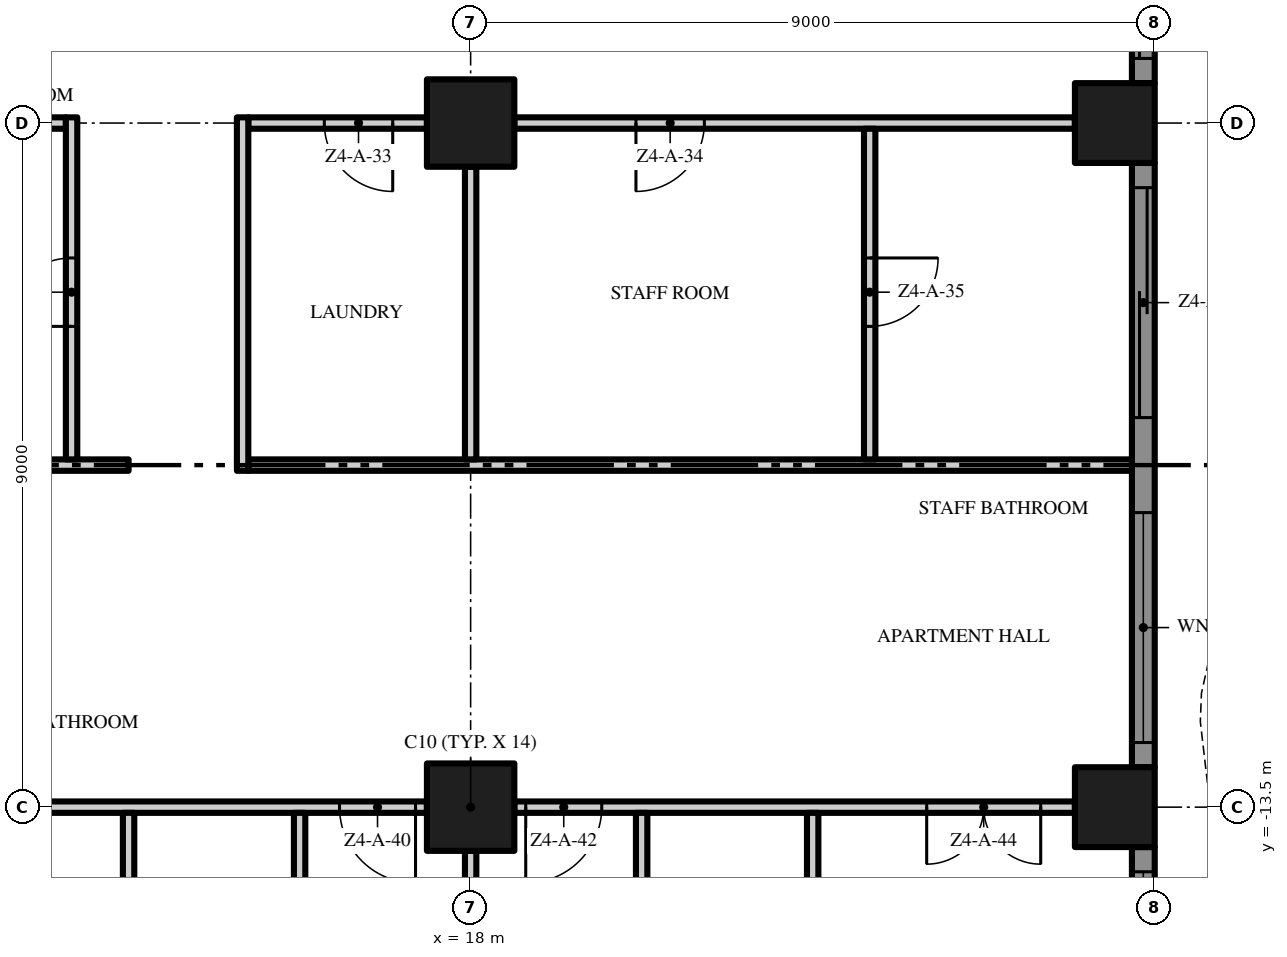
"""IFC4 building model, lengths in metres.
Left out: names, types, materials, properties, quantities, classifications, styles, units other than length and angle.
Written with IfcOpenShell. Run it as: python <this file> out.ifc"""

import sys

from ifc_helpers import new_model, si_unit, direction, frame, frame_2d, origin, origin_2d, place, context, subcontext, project, spatial, polyline, rectangle, outline, extrude, element, fill, save


model = new_model("IFC4")
c1 = context("Model", 3, precision=1e-05, world=origin(), true_north=direction((0.0, 1.0)))
c2 = subcontext(c1, "Body", "Model", "MODEL_VIEW")
j1 = project(units=[si_unit("LENGTHUNIT", "METRE"), si_unit("PLANEANGLEUNIT", "RADIAN")], contexts=[c1])
p1 = place(None, origin())
s1 = spatial("IfcSite", under=j1, at=p1, CompositionType="ELEMENT")
p2 = place(p1, origin())
s2 = spatial("IfcBuilding", under=s1, at=p2, CompositionType="ELEMENT")
p3 = place(p2, frame((0.0, 0.0, 192.0)))
s3 = spatial("IfcBuildingStorey", under=s2, at=p3, CompositionType="ELEMENT", Elevation=192.0)
for number, where, z_axis, x_axis in (
    (1, (18.0, -13.5, 0.0), (0.0, 0.0, 1.0), (1.0, 0.0, 0.0)),
    (2, (18.0, -4.5, 0.0), (0.0, 0.0, 1.0), (1.0, 0.0, 0.0)),
):
    element("IfcColumn", number, at=place(p3, frame(where, z_axis=z_axis, x_axis=x_axis)), inside=s3, PredefinedType="COLUMN", context=c2, shape_type="SweptSolid", body=[
        extrude(rectangle(XDim=1.15, YDim=1.15, at=origin_2d()), origin(), (0.0, 0.0, 1.0), 3.5),
    ])
for number, where, z_axis, x_axis in (
    (3, (26.475, -13.5, 0.0), (0.0, 0.0, 1.0), (1.0, 0.0, 0.0)),
    (4, (26.475, -4.5, 0.0), (0.0, 0.0, 1.0), (1.0, 0.0, 0.0)),
):
    element("IfcColumn", number, at=place(p3, frame(where, z_axis=z_axis, x_axis=x_axis)), inside=s3, PredefinedType="COLUMN", context=c2, shape_type="SweptSolid", body=[
        extrude(rectangle(XDim=1.05, YDim=1.05, at=origin_2d()), origin(), (0.0, 0.0, 1.0), 3.5),
    ])
p4 = place(p3, frame((26.85, -14.025, 0.0), z_axis=(0.0, 0.0, 1.0), x_axis=(0.0, -1.0, 0.0)))
e5 = element("IfcWall", 5, at=p4, inside=s3, PredefinedType="SOLIDWALL", context=c2, shape_type="SweptSolid", body=[
    extrude(rectangle(XDim=3.675, YDim=0.3, at=frame_2d((1.837, 0.0))), origin(), (0.0, 0.0, 1.0), 3.5),
])
p5 = place(p4, frame((0.325, 0.0, 0.45)))
e6 = element("IfcOpeningElement", 6, at=p5, cuts=e5, PredefinedType="OPENING", context=c2, shape_type="SweptSolid", body=[
    extrude(rectangle(XDim=3.025, YDim=2.65, at=frame_2d((1.512, 1.325))), frame((0.0, 0.16, 0.0), z_axis=(0.0, -1.0, 0.0), x_axis=(1.0, 0.0, 0.0)), (0.0, 0.0, 1.0), 0.32),
])
p6 = place(p3, frame((26.85, -5.025, 0.0), z_axis=(0.0, 0.0, 1.0), x_axis=(0.0, -1.0, 0.0)))
e7 = element("IfcWall", 7, at=p6, inside=s3, PredefinedType="SOLIDWALL", context=c2, shape_type="SweptSolid", body=[
    extrude(rectangle(XDim=7.95, YDim=0.3, at=frame_2d((3.975, 0.0))), origin(), (0.0, 0.0, 1.0), 3.5),
])
p7 = place(p6, frame((4.6, 0.0, 0.45)))
e8 = element("IfcOpeningElement", 8, at=p7, cuts=e7, PredefinedType="OPENING", context=c2, shape_type="SweptSolid", body=[
    extrude(rectangle(XDim=3.025, YDim=2.65, at=frame_2d((1.512, 1.325))), frame((0.0, 0.16, 0.0), z_axis=(0.0, -1.0, 0.0), x_axis=(1.0, 0.0, 0.0)), (0.0, 0.0, 1.0), 0.32),
])
p8 = place(p6, frame((0.325, 0.0, 0.0)))
e9 = element("IfcOpeningElement", 9, at=p8, cuts=e7, PredefinedType="OPENING", context=c2, shape_type="SweptSolid", body=[
    extrude(rectangle(XDim=3.025, YDim=2.4, at=frame_2d((1.512, 1.2))), frame((0.0, 0.16, 0.0), z_axis=(0.0, -1.0, 0.0), x_axis=(1.0, 0.0, 0.0)), (0.0, 0.0, 1.0), 0.32),
])
p9 = place(p3, frame((26.85, 3.975, 0.0), z_axis=(0.0, 0.0, 1.0), x_axis=(0.0, -1.0, 0.0)))
e10 = element("IfcWall", 10, at=p9, inside=s3, PredefinedType="SOLIDWALL", context=c2, shape_type="SweptSolid", body=[
    extrude(rectangle(XDim=7.95, YDim=0.3, at=frame_2d((3.975, 0.0))), origin(), (0.0, 0.0, 1.0), 3.5),
])
p10 = place(p9, frame((4.6, 0.0, 0.0)))
e11 = element("IfcOpeningElement", 11, at=p10, cuts=e10, PredefinedType="OPENING", context=c2, shape_type="SweptSolid", body=[
    extrude(rectangle(XDim=3.025, YDim=2.4, at=frame_2d((1.512, 1.2))), frame((0.0, 0.16, 0.0), z_axis=(0.0, -1.0, 0.0), x_axis=(1.0, 0.0, 0.0)), (0.0, 0.0, 1.0), 0.32),
])
p11 = place(p9, frame((0.325, 0.0, 0.45)))
e12 = element("IfcOpeningElement", 12, at=p11, cuts=e10, PredefinedType="OPENING", context=c2, shape_type="SweptSolid", body=[
    extrude(rectangle(XDim=3.025, YDim=2.65, at=frame_2d((1.512, 1.325))), frame((0.0, 0.16, 0.0), z_axis=(0.0, -1.0, 0.0), x_axis=(1.0, 0.0, 0.0)), (0.0, 0.0, 1.0), 0.32),
])
p12 = place(p3, origin())
e13 = element("IfcWall", 13, at=p12, inside=s3, PredefinedType="USERDEFINED", context=c2, shape_type="SweptSolid", body=[
    extrude(outline(polyline([(29.649, -18.0), (28.988, -16.5), (28.255, -15.0), (27.731, -13.5), (27.6, -12.375), (27.615, -12.0), (27.951, -10.5), (28.612, -9.0), (29.345, -7.5), (29.869, -6.0), (30.0, -4.875), (29.985, -4.5), (29.649, -3.0), (28.988, -1.5), (28.255, 0.0), (27.731, 1.5), (27.6, 2.625), (27.615, 3.0), (27.951, 4.5), (28.612, 6.0), (29.345, 7.5), (29.869, 9.0), (30.0, 10.125), (29.985, 10.5), (29.649, 12.0), (28.988, 13.5), (28.255, 15.0), (27.731, 16.5), (27.6, 17.625), (27.615, 18.0), (27.365, 18.01), (27.349, 17.615), (27.486, 16.444), (28.024, 14.904), (28.761, 13.395), (29.41, 11.921), (29.736, 10.467), (29.749, 10.135), (29.624, 9.056), (29.114, 7.596), (28.385, 6.105), (27.713, 4.579), (27.366, 3.033), (27.349, 2.615), (27.486, 1.444), (28.024, -0.096), (28.761, -1.605), (29.41, -3.079), (29.736, -4.533), (29.749, -4.865), (29.624, -5.944), (29.114, -7.404), (28.385, -8.895), (27.713, -10.421), (27.366, -11.967), (27.349, -12.385), (27.486, -13.556), (28.024, -15.096), (28.761, -16.605), (29.42, -18.101), (29.649, -18.0)])), origin(), (0.0, 0.0, 1.0), 0.9),
])
p13 = place(p3, frame((17.425, -13.5, 0.0), z_axis=(0.0, 0.0, 1.0), x_axis=(-1.0, 0.0, 0.0)))
e14 = element("IfcWall", 14, at=p13, inside=s3, PredefinedType="PARTITIONING", context=c2, shape_type="SweptSolid", body=[
    extrude(rectangle(XDim=7.85, YDim=0.15, at=frame_2d((3.925, 0.0))), origin(), (0.0, 0.0, 1.0), 3.5),
])
p14 = place(p13, frame((6.7, 0.0, 0.0)))
e15 = element("IfcOpeningElement", 15, at=p14, cuts=e14, PredefinedType="OPENING", context=c2, shape_type="SweptSolid", body=[
    extrude(rectangle(XDim=1.0, YDim=2.4, at=frame_2d((0.5, 1.2))), frame((0.0, 0.085, 0.0), z_axis=(0.0, -1.0, 0.0), x_axis=(1.0, 0.0, 0.0)), (0.0, 0.0, 1.0), 0.17),
])
p15 = place(p13, frame((0.15, 0.0, 0.0)))
e16 = element("IfcOpeningElement", 16, at=p15, cuts=e14, PredefinedType="OPENING", context=c2, shape_type="SweptSolid", body=[
    extrude(rectangle(XDim=1.0, YDim=2.4, at=frame_2d((0.5, 1.2))), frame((0.0, 0.085, 0.0), z_axis=(0.0, -1.0, 0.0), x_axis=(1.0, 0.0, 0.0)), (0.0, 0.0, 1.0), 0.17),
])
p16 = place(p3, frame((25.95, -13.5, 0.0), z_axis=(0.0, 0.0, 1.0), x_axis=(-1.0, 0.0, 0.0)))
e17 = element("IfcWall", 17, at=p16, inside=s3, PredefinedType="PARTITIONING", context=c2, shape_type="SweptSolid", body=[
    extrude(rectangle(XDim=7.375, YDim=0.15, at=frame_2d((3.688, 0.0))), origin(), (0.0, 0.0, 1.0), 3.5),
])
p17 = place(p16, frame((6.225, 0.0, 0.0)))
e18 = element("IfcOpeningElement", 18, at=p17, cuts=e17, PredefinedType="OPENING", context=c2, shape_type="SweptSolid", body=[
    extrude(rectangle(XDim=1.0, YDim=2.4, at=frame_2d((0.5, 1.2))), frame((0.0, 0.085, 0.0), z_axis=(0.0, -1.0, 0.0), x_axis=(1.0, 0.0, 0.0)), (0.0, 0.0, 1.0), 0.17),
])
p18 = place(p16, frame((0.45, 0.0, 0.0)))
e19 = element("IfcOpeningElement", 19, at=p18, cuts=e17, PredefinedType="OPENING", context=c2, shape_type="SweptSolid", body=[
    extrude(rectangle(XDim=1.5, YDim=2.4, at=frame_2d((0.75, 1.2))), frame((0.0, 0.085, 0.0), z_axis=(0.0, -1.0, 0.0), x_axis=(1.0, 0.0, 0.0)), (0.0, 0.0, 1.0), 0.17),
])
p19 = place(p3, frame((0.1, -9.0, 0.0), z_axis=(0.0, 0.0, 1.0), x_axis=(1.0, 0.0, 0.0)))
e20 = element("IfcWall", 20, at=p19, inside=s3, PredefinedType="PARTITIONING", context=c2, shape_type="SweptSolid", body=[
    extrude(rectangle(XDim=13.4, YDim=0.15, at=frame_2d((6.7, 0.0))), origin(), (0.0, 0.0, 1.0), 3.5),
])
p20 = place(p19, frame((6.9, 0.0, 0.0)))
e21 = element("IfcOpeningElement", 21, at=p20, cuts=e20, PredefinedType="OPENING", context=c2, shape_type="SweptSolid", body=[
    extrude(rectangle(XDim=1.0, YDim=2.4, at=frame_2d((0.5, 1.2))), frame((0.0, 0.085, 0.0), z_axis=(0.0, -1.0, 0.0), x_axis=(1.0, 0.0, 0.0)), (0.0, 0.0, 1.0), 0.17),
])
p21 = place(p3, frame((15.075, -9.0, 0.0), z_axis=(0.0, 0.0, 1.0), x_axis=(1.0, 0.0, 0.0)))
e22 = element("IfcWall", 22, at=p21, inside=s3, PredefinedType="PARTITIONING", context=c2, shape_type="SweptSolid", body=[
    extrude(rectangle(XDim=11.625, YDim=0.15, at=frame_2d((5.812, 0.0))), origin(), (0.0, 0.0, 1.0), 3.5),
])
p22 = place(p3, frame((9.575, -4.5, 0.0), z_axis=(0.0, 0.0, 1.0), x_axis=(1.0, 0.0, 0.0)))
e23 = element("IfcWall", 23, at=p22, inside=s3, PredefinedType="PARTITIONING", context=c2, shape_type="SweptSolid", body=[
    extrude(rectangle(XDim=3.1, YDim=0.15, at=frame_2d((1.55, 0.0))), origin(), (0.0, 0.0, 1.0), 3.5),
])
p23 = place(p3, frame((17.425, -4.5, 0.0), z_axis=(0.0, 0.0, 1.0), x_axis=(-1.0, 0.0, 0.0)))
e24 = element("IfcWall", 24, at=p23, inside=s3, PredefinedType="PARTITIONING", context=c2, shape_type="SweptSolid", body=[
    extrude(rectangle(XDim=2.35, YDim=0.15, at=frame_2d((1.175, 0.0))), origin(), (0.0, 0.0, 1.0), 3.5),
])
p24 = place(p23, frame((0.45, 0.0, 0.0)))
e25 = element("IfcOpeningElement", 25, at=p24, cuts=e24, PredefinedType="OPENING", context=c2, shape_type="SweptSolid", body=[
    extrude(rectangle(XDim=0.9, YDim=2.1, at=frame_2d((0.45, 1.05))), frame((0.0, 0.085, 0.0), z_axis=(0.0, -1.0, 0.0), x_axis=(1.0, 0.0, 0.0)), (0.0, 0.0, 1.0), 0.17),
])
p25 = place(p3, frame((25.95, -4.5, 0.0), z_axis=(0.0, 0.0, 1.0), x_axis=(-1.0, 0.0, 0.0)))
e26 = element("IfcWall", 26, at=p25, inside=s3, PredefinedType="PARTITIONING", context=c2, shape_type="SweptSolid", body=[
    extrude(rectangle(XDim=7.375, YDim=0.15, at=frame_2d((3.688, 0.0))), origin(), (0.0, 0.0, 1.0), 3.5),
])
p26 = place(p25, frame((4.875, 0.0, 0.0)))
e27 = element("IfcOpeningElement", 27, at=p26, cuts=e26, PredefinedType="OPENING", context=c2, shape_type="SweptSolid", body=[
    extrude(rectangle(XDim=0.9, YDim=2.1, at=frame_2d((0.45, 1.05))), frame((0.0, 0.085, 0.0), z_axis=(0.0, -1.0, 0.0), x_axis=(1.0, 0.0, 0.0)), (0.0, 0.0, 1.0), 0.17),
])
p27 = place(p3, frame((12.75, -8.925, 0.0), z_axis=(0.0, 0.0, 1.0), x_axis=(0.0, 1.0, 0.0)))
e28 = element("IfcWall", 28, at=p27, inside=s3, PredefinedType="PARTITIONING", context=c2, shape_type="SweptSolid", body=[
    extrude(rectangle(XDim=4.5, YDim=0.15, at=frame_2d((2.25, 0.0))), origin(), (0.0, 0.0, 1.0), 3.5),
])
p28 = place(p27, frame((1.75, 0.0, 0.0)))
e29 = element("IfcOpeningElement", 29, at=p28, cuts=e28, PredefinedType="OPENING", context=c2, shape_type="SweptSolid", body=[
    extrude(rectangle(XDim=0.9, YDim=2.1, at=frame_2d((0.45, 1.05))), frame((0.0, 0.085, 0.0), z_axis=(0.0, -1.0, 0.0), x_axis=(1.0, 0.0, 0.0)), (0.0, 0.0, 1.0), 0.17),
])
p29 = place(p3, frame((13.5, -22.2, 0.0), z_axis=(0.0, 0.0, 1.0), x_axis=(0.0, 1.0, 0.0)))
e30 = element("IfcWall", 30, at=p29, inside=s3, PredefinedType="PARTITIONING", context=c2, shape_type="SweptSolid", body=[
    extrude(rectangle(XDim=8.625, YDim=0.15, at=frame_2d((4.312, 0.0))), origin(), (0.0, 0.0, 1.0), 3.5),
])
p30 = place(p3, frame((15.0, -9.075, 0.0), z_axis=(0.0, 0.0, 1.0), x_axis=(0.0, 1.0, 0.0)))
e31 = element("IfcWall", 31, at=p30, inside=s3, PredefinedType="PARTITIONING", context=c2, shape_type="SweptSolid", body=[
    extrude(rectangle(XDim=4.65, YDim=0.15, at=frame_2d((2.325, 0.0))), origin(), (0.0, 0.0, 1.0), 3.5),
])
p31 = place(p3, frame((15.75, -16.575, 0.0), z_axis=(0.0, 0.0, 1.0), x_axis=(0.0, 1.0, 0.0)))
e32 = element("IfcWall", 32, at=p31, inside=s3, PredefinedType="PARTITIONING", context=c2, shape_type="SweptSolid", body=[
    extrude(rectangle(XDim=3.0, YDim=0.15, at=frame_2d((1.5, 0.0))), origin(), (0.0, 0.0, 1.0), 3.5),
])
p32 = place(p3, frame((18.0, -21.45, 0.0), z_axis=(0.0, 0.0, 1.0), x_axis=(0.0, 1.0, 0.0)))
e33 = element("IfcWall", 33, at=p32, inside=s3, PredefinedType="PARTITIONING", context=c2, shape_type="SweptSolid", body=[
    extrude(rectangle(XDim=7.375, YDim=0.15, at=frame_2d((3.688, 0.0))), origin(), (0.0, 0.0, 1.0), 3.5),
])
p33 = place(p3, frame((18.0, -8.925, 0.0), z_axis=(0.0, 0.0, 1.0), x_axis=(0.0, 1.0, 0.0)))
e34 = element("IfcWall", 34, at=p33, inside=s3, PredefinedType="PARTITIONING", context=c2, shape_type="SweptSolid", body=[
    extrude(rectangle(XDim=3.85, YDim=0.15, at=frame_2d((1.925, 0.0))), origin(), (0.0, 0.0, 1.0), 3.5),
])
p34 = place(p3, frame((20.25, -16.575, 0.0), z_axis=(0.0, 0.0, 1.0), x_axis=(0.0, 1.0, 0.0)))
e35 = element("IfcWall", 35, at=p34, inside=s3, PredefinedType="PARTITIONING", context=c2, shape_type="SweptSolid", body=[
    extrude(rectangle(XDim=3.0, YDim=0.15, at=frame_2d((1.5, 0.0))), origin(), (0.0, 0.0, 1.0), 3.5),
])
p35 = place(p3, frame((22.5, -17.475, 0.0), z_axis=(0.0, 0.0, 1.0), x_axis=(0.0, 1.0, 0.0)))
e36 = element("IfcWall", 36, at=p35, inside=s3, PredefinedType="PARTITIONING", context=c2, shape_type="SweptSolid", body=[
    extrude(rectangle(XDim=3.9, YDim=0.15, at=frame_2d((1.95, 0.0))), origin(), (0.0, 0.0, 1.0), 3.5),
])
p36 = place(p3, frame((23.25, -4.575, 0.0), z_axis=(0.0, 0.0, 1.0), x_axis=(0.0, -1.0, 0.0)))
e37 = element("IfcWall", 37, at=p36, inside=s3, PredefinedType="PARTITIONING", context=c2, shape_type="SweptSolid", body=[
    extrude(rectangle(XDim=4.35, YDim=0.15, at=frame_2d((2.175, 0.0))), origin(), (0.0, 0.0, 1.0), 3.5),
])
p37 = place(p36, frame((1.7, 0.0, 0.0)))
e38 = element("IfcOpeningElement", 38, at=p37, cuts=e37, PredefinedType="OPENING", context=c2, shape_type="SweptSolid", body=[
    extrude(rectangle(XDim=0.9, YDim=2.1, at=frame_2d((0.45, 1.05))), frame((0.0, 0.085, 0.0), z_axis=(0.0, -1.0, 0.0), x_axis=(1.0, 0.0, 0.0)), (0.0, 0.0, 1.0), 0.17),
])
p38 = place(p5, origin())
e39 = element("IfcWindow", 39, at=p38, inside=s3, PartitioningType="SINGLE_PANEL", PredefinedType="WINDOW", context=c2, shape_type="SweptSolid", body=[
    extrude(rectangle(XDim=3.025, YDim=2.65, at=frame_2d((1.512, 1.325))), frame((0.0, 0.03, 0.0), z_axis=(0.0, -1.0, 0.0), x_axis=(1.0, 0.0, 0.0)), (0.0, 0.0, 1.0), 0.06),
])
fill(e6, e39)
p39 = place(p7, origin())
e40 = element("IfcWindow", 40, at=p39, inside=s3, PartitioningType="SINGLE_PANEL", PredefinedType="WINDOW", context=c2, shape_type="SweptSolid", body=[
    extrude(rectangle(XDim=3.025, YDim=2.65, at=frame_2d((1.512, 1.325))), frame((0.0, 0.03, 0.0), z_axis=(0.0, -1.0, 0.0), x_axis=(1.0, 0.0, 0.0)), (0.0, 0.0, 1.0), 0.06),
])
fill(e8, e40)
p40 = place(p8, origin())
e41 = element("IfcDoor", 41, at=p40, inside=s3, OperationType="SINGLE_SWING_LEFT", PredefinedType="DOOR", context=c2, shape_type="SweptSolid", body=[
    extrude(rectangle(XDim=3.025, YDim=2.4, at=frame_2d((1.512, 1.2))), frame((0.0, 0.025, 0.0), z_axis=(0.0, -1.0, 0.0), x_axis=(1.0, 0.0, 0.0)), (0.0, 0.0, 1.0), 0.05),
])
fill(e9, e41)
p41 = place(p10, origin())
e42 = element("IfcDoor", 42, at=p41, inside=s3, OperationType="SINGLE_SWING_LEFT", PredefinedType="DOOR", context=c2, shape_type="SweptSolid", body=[
    extrude(rectangle(XDim=3.025, YDim=2.4, at=frame_2d((1.512, 1.2))), frame((0.0, 0.025, 0.0), z_axis=(0.0, -1.0, 0.0), x_axis=(1.0, 0.0, 0.0)), (0.0, 0.0, 1.0), 0.05),
])
fill(e11, e42)
p42 = place(p28, origin())
e43 = element("IfcDoor", 43, at=p42, inside=s3, OperationType="SINGLE_SWING_LEFT", PredefinedType="DOOR", context=c2, shape_type="SweptSolid", body=[
    extrude(rectangle(XDim=0.9, YDim=2.1, at=frame_2d((0.45, 1.05))), frame((0.0, 0.025, 0.0), z_axis=(0.0, -1.0, 0.0), x_axis=(1.0, 0.0, 0.0)), (0.0, 0.0, 1.0), 0.05),
])
fill(e29, e43)
p43 = place(p24, origin())
e44 = element("IfcDoor", 44, at=p43, inside=s3, OperationType="SINGLE_SWING_LEFT", PredefinedType="DOOR", context=c2, shape_type="SweptSolid", body=[
    extrude(rectangle(XDim=0.9, YDim=2.1, at=frame_2d((0.45, 1.05))), frame((0.0, 0.025, 0.0), z_axis=(0.0, -1.0, 0.0), x_axis=(1.0, 0.0, 0.0)), (0.0, 0.0, 1.0), 0.05),
])
fill(e25, e44)
p44 = place(p26, origin())
e45 = element("IfcDoor", 45, at=p44, inside=s3, OperationType="SINGLE_SWING_RIGHT", PredefinedType="DOOR", context=c2, shape_type="SweptSolid", body=[
    extrude(rectangle(XDim=0.9, YDim=2.1, at=frame_2d((0.45, 1.05))), frame((0.0, 0.025, 0.0), z_axis=(0.0, -1.0, 0.0), x_axis=(1.0, 0.0, 0.0)), (0.0, 0.0, 1.0), 0.05),
])
fill(e27, e45)
p45 = place(p37, origin())
e46 = element("IfcDoor", 46, at=p45, inside=s3, OperationType="SINGLE_SWING_LEFT", PredefinedType="DOOR", context=c2, shape_type="SweptSolid", body=[
    extrude(rectangle(XDim=0.9, YDim=2.1, at=frame_2d((0.45, 1.05))), frame((0.0, 0.025, 0.0), z_axis=(0.0, -1.0, 0.0), x_axis=(1.0, 0.0, 0.0)), (0.0, 0.0, 1.0), 0.05),
])
fill(e38, e46)
p46 = place(p15, origin())
e47 = element("IfcDoor", 47, at=p46, inside=s3, OperationType="SINGLE_SWING_LEFT", PredefinedType="DOOR", context=c2, shape_type="SweptSolid", body=[
    extrude(rectangle(XDim=1.0, YDim=2.4, at=frame_2d((0.5, 1.2))), frame((0.0, 0.025, 0.0), z_axis=(0.0, -1.0, 0.0), x_axis=(1.0, 0.0, 0.0)), (0.0, 0.0, 1.0), 0.05),
])
fill(e16, e47)
p47 = place(p17, origin())
e48 = element("IfcDoor", 48, at=p47, inside=s3, OperationType="SINGLE_SWING_RIGHT", PredefinedType="DOOR", context=c2, shape_type="SweptSolid", body=[
    extrude(rectangle(XDim=1.0, YDim=2.4, at=frame_2d((0.5, 1.2))), frame((0.0, 0.025, 0.0), z_axis=(0.0, -1.0, 0.0), x_axis=(1.0, 0.0, 0.0)), (0.0, 0.0, 1.0), 0.05),
])
fill(e18, e48)
p48 = place(p18, origin())
e49 = element("IfcDoor", 49, at=p48, inside=s3, OperationType="DOUBLE_DOOR_SINGLE_SWING", PredefinedType="DOOR", context=c2, shape_type="SweptSolid", body=[
    extrude(rectangle(XDim=1.5, YDim=2.4, at=frame_2d((0.75, 1.2))), frame((0.0, 0.025, 0.0), z_axis=(0.0, -1.0, 0.0), x_axis=(1.0, 0.0, 0.0)), (0.0, 0.0, 1.0), 0.05),
])
fill(e19, e49)
save(model, sys.argv[1])
